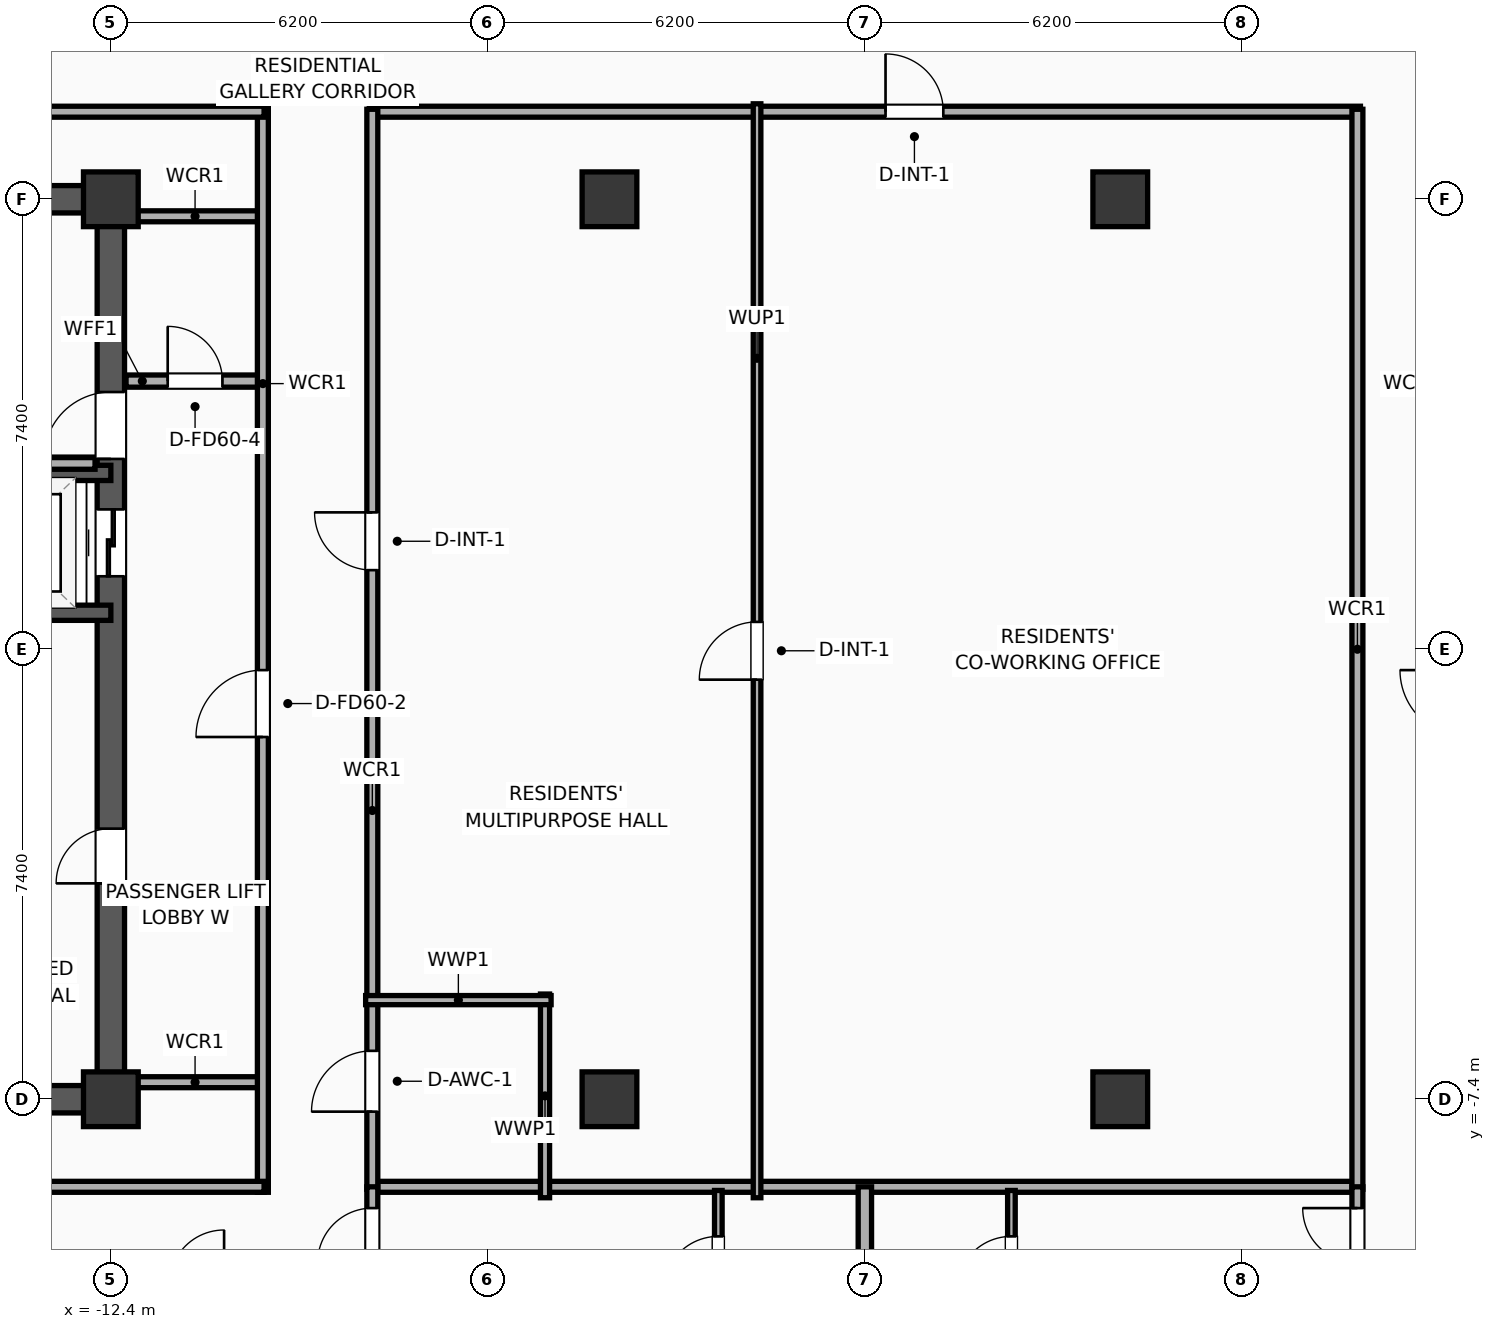
"""IFC4 building model, lengths in metres.
Left out: names, types, materials, properties, quantities, classifications, styles, units other than length and angle.
Written with IfcOpenShell. Run it as: python <this file> out.ifc"""

import sys

from ifc_helpers import new_model, si_unit, direction, frame, frame_2d, origin, origin_2d, place, context, subcontext, project, spatial, rectangle, extrude, element, fill, save


model = new_model("IFC4")
c1 = context("Model", 3, precision=1e-05, world=origin(), true_north=direction((0.0, 1.0)))
c2 = subcontext(c1, "Body", "Model", "MODEL_VIEW")
j1 = project(units=[si_unit("LENGTHUNIT", "METRE"), si_unit("PLANEANGLEUNIT", "RADIAN")], contexts=[c1])
p1 = place(None, origin())
s1 = spatial("IfcSite", under=j1, at=p1, CompositionType="ELEMENT")
p2 = place(p1, origin())
s2 = spatial("IfcBuilding", under=s1, at=p2, CompositionType="ELEMENT")
p3 = place(p2, frame((0.0, 0.0, 227.5)))
s3 = spatial("IfcBuildingStorey", under=s2, at=p3, CompositionType="ELEMENT", Elevation=227.5)
for number, where, z_axis, x_axis in (
    (1, (-12.4, -7.4, 0.0), (0.0, 0.0, 1.0), (1.0, 0.0, 0.0)),
    (2, (-12.4, 7.4, 0.0), (0.0, 0.0, 1.0), (1.0, 0.0, 0.0)),
):
    element("IfcColumn", number, at=place(p3, frame(where, z_axis=z_axis, x_axis=x_axis)), inside=s3, PredefinedType="COLUMN", context=c2, shape_type="SweptSolid", body=[
        extrude(rectangle(XDim=0.9, YDim=0.9, at=origin_2d()), origin(), (0.0, 0.0, 1.0), 3.9),
    ])
for number, where, z_axis, x_axis in (
    (3, (-19.425, -7.4, 0.0), (0.0, 0.0, 1.0), (1.0, 0.0, 0.0)),
    (4, (-19.425, 7.4, 0.0), (0.0, 0.0, 1.0), (1.0, 0.0, 0.0)),
):
    element("IfcWall", number, at=place(p3, frame(where, z_axis=z_axis, x_axis=x_axis)), inside=s3, PredefinedType="SHEAR", context=c2, shape_type="SweptSolid", body=[
        extrude(rectangle(XDim=7.25, YDim=0.45, at=frame_2d((3.625, 0.0))), origin(), (0.0, 0.0, 1.0), 3.65),
    ])
p4 = place(p3, frame((-12.4, -7.4, 0.0), z_axis=(0.0, 0.0, 1.0), x_axis=(0.0, 1.0, 0.0)))
e5 = element("IfcWall", 5, at=p4, inside=s3, PredefinedType="SHEAR", context=c2, shape_type="SweptSolid", body=[
    extrude(rectangle(XDim=14.8, YDim=0.45, at=frame_2d((7.4, 0.0))), origin(), (0.0, 0.0, 1.0), 3.65),
])
p5 = place(p4, frame((8.6, 0.0, 0.0)))
e6 = element("IfcOpeningElement", 6, at=p5, cuts=e5, PredefinedType="OPENING", context=c2, shape_type="SweptSolid", body=[
    extrude(rectangle(XDim=1.1, YDim=2.05, at=frame_2d((0.55, 1.025))), frame((0.0, 0.235, 0.0), z_axis=(0.0, -1.0, 0.0), x_axis=(1.0, 0.0, 0.0)), (0.0, 0.0, 1.0), 0.47),
])
p6 = place(p4, frame((10.53, 0.0, 0.0)))
e7 = element("IfcOpeningElement", 7, at=p6, cuts=e5, PredefinedType="OPENING", context=c2, shape_type="SweptSolid", body=[
    extrude(rectangle(XDim=1.1, YDim=2.05, at=frame_2d((0.55, 1.025))), frame((0.0, 0.235, 0.0), z_axis=(0.0, -1.0, 0.0), x_axis=(1.0, 0.0, 0.0)), (0.0, 0.0, 1.0), 0.47),
])
p7 = place(p4, frame((3.55, 0.0, 0.0)))
e8 = element("IfcOpeningElement", 8, at=p7, cuts=e5, PredefinedType="OPENING", context=c2, shape_type="SweptSolid", body=[
    extrude(rectangle(XDim=0.9, YDim=2.05, at=frame_2d((0.45, 1.025))), frame((0.0, 0.235, 0.0), z_axis=(0.0, -1.0, 0.0), x_axis=(1.0, 0.0, 0.0)), (0.0, 0.0, 1.0), 0.47),
])
for number, where, z_axis, x_axis in (
    (9, (-4.2, -7.4, 0.0), (0.0, 0.0, 1.0), (1.0, 0.0, 0.0)),
    (10, (-4.2, 7.4, 0.0), (0.0, 0.0, 1.0), (1.0, 0.0, 0.0)),
    (11, (4.2, -7.4, 0.0), (0.0, 0.0, 1.0), (1.0, 0.0, 0.0)),
    (12, (4.2, 7.4, 0.0), (0.0, 0.0, 1.0), (1.0, 0.0, 0.0)),
):
    element("IfcColumn", number, at=place(p3, frame(where, z_axis=z_axis, x_axis=x_axis)), inside=s3, PredefinedType="COLUMN", context=c2, shape_type="SweptSolid", body=[
        extrude(rectangle(XDim=0.9, YDim=0.9, at=origin_2d()), origin(), (0.0, 0.0, 1.0), 3.9),
    ])
for number, where, z_axis, x_axis in (
    (13, (-15.4, 0.6, 0.0), (0.0, 0.0, 1.0), (1.0, 0.0, 0.0)),
    (14, (-12.4, 2.9, 0.0), (0.0, 0.0, 1.0), (-1.0, 0.0, 0.0)),
):
    element("IfcWall", number, at=place(p3, frame(where, z_axis=z_axis, x_axis=x_axis)), inside=s3, PredefinedType="SOLIDWALL", context=c2, shape_type="SweptSolid", body=[
        extrude(rectangle(XDim=3.0, YDim=0.25, at=frame_2d((1.5, 0.0))), origin(), (0.0, 0.0, 1.0), 3.65),
    ])
p8 = place(p3, frame((-15.82, 3.06, 0.0), z_axis=(0.0, 0.0, 1.0), x_axis=(1.0, 0.0, 0.0)))
e15 = element("IfcWall", 15, at=p8, inside=s3, PredefinedType="PARTITIONING", context=c2, shape_type="SweptSolid", body=[
    extrude(rectangle(XDim=3.16, YDim=0.2, at=frame_2d((1.58, 0.0))), origin(), (0.0, 0.0, 1.0), 3.65),
])
p9 = place(p3, frame((-12.15, 4.41, 0.0), z_axis=(0.0, 0.0, 1.0), x_axis=(1.0, 0.0, 0.0)))
e16 = element("IfcWall", 16, at=p9, inside=s3, PredefinedType="PARTITIONING", context=c2, shape_type="SweptSolid", body=[
    extrude(rectangle(XDim=2.27, YDim=0.2, at=frame_2d((1.135, 0.0))), origin(), (0.0, 0.0, 1.0), 3.65),
])
p10 = place(p9, frame((0.685, 0.0, 0.0)))
e17 = element("IfcOpeningElement", 17, at=p10, cuts=e16, PredefinedType="OPENING", context=c2, shape_type="SweptSolid", body=[
    extrude(rectangle(XDim=0.9, YDim=2.05, at=frame_2d((0.45, 1.025))), frame((0.0, 0.11, 0.0), z_axis=(0.0, -1.0, 0.0), x_axis=(1.0, 0.0, 0.0)), (0.0, 0.0, 1.0), 0.22),
])
for number, where, z_axis, x_axis in (
    (18, (-12.15, 7.12, 0.0), (0.0, 0.0, 1.0), (1.0, 0.0, 0.0)),
    (19, (-12.15, -7.12, 0.0), (0.0, 0.0, 1.0), (1.0, 0.0, 0.0)),
):
    element("IfcWall", number, at=place(p3, frame(where, z_axis=z_axis, x_axis=x_axis)), inside=s3, PredefinedType="PARTITIONING", context=c2, shape_type="SweptSolid", body=[
        extrude(rectangle(XDim=2.27, YDim=0.18, at=frame_2d((1.135, 0.0))), origin(), (0.0, 0.0, 1.0), 3.65),
    ])
p11 = place(p3, frame((-9.9, -8.93, 0.0), z_axis=(0.0, 0.0, 1.0), x_axis=(0.0, 1.0, 0.0)))
e20 = element("IfcWall", 20, at=p11, inside=s3, PredefinedType="PARTITIONING", context=c2, shape_type="SweptSolid", body=[
    extrude(rectangle(XDim=17.86, YDim=0.18, at=frame_2d((8.93, 0.0))), origin(), (0.0, 0.0, 1.0), 3.65),
])
p12 = place(p11, frame((7.487, 0.0, 0.0)))
e21 = element("IfcOpeningElement", 21, at=p12, cuts=e20, PredefinedType="OPENING", context=c2, shape_type="SweptSolid", body=[
    extrude(rectangle(XDim=1.1, YDim=2.05, at=frame_2d((0.55, 1.025))), frame((0.0, 0.1, 0.0), z_axis=(0.0, -1.0, 0.0), x_axis=(1.0, 0.0, 0.0)), (0.0, 0.0, 1.0), 0.2),
])
p13 = place(p3, frame((-26.23, 8.84, 0.0), z_axis=(0.0, 0.0, 1.0), x_axis=(1.0, 0.0, 0.0)))
e22 = element("IfcWall", 22, at=p13, inside=s3, PredefinedType="PARTITIONING", context=c2, shape_type="SweptSolid", body=[
    extrude(rectangle(XDim=16.35, YDim=0.18, at=frame_2d((8.175, 0.0))), origin(), (0.0, 0.0, 1.0), 3.65),
])
p14 = place(p13, frame((2.2, 0.0, 0.0)))
e23 = element("IfcOpeningElement", 23, at=p14, cuts=e22, PredefinedType="OPENING", context=c2, shape_type="SweptSolid", body=[
    extrude(rectangle(XDim=1.15, YDim=2.05, at=frame_2d((0.575, 1.025))), frame((0.0, 0.1, 0.0), z_axis=(0.0, -1.0, 0.0), x_axis=(1.0, 0.0, 0.0)), (0.0, 0.0, 1.0), 0.2),
])
p15 = place(p3, frame((-26.23, -8.84, 0.0), z_axis=(0.0, 0.0, 1.0), x_axis=(1.0, 0.0, 0.0)))
e24 = element("IfcWall", 24, at=p15, inside=s3, PredefinedType="PARTITIONING", context=c2, shape_type="SweptSolid", body=[
    extrude(rectangle(XDim=16.35, YDim=0.18, at=frame_2d((8.175, 0.0))), origin(), (0.0, 0.0, 1.0), 3.65),
])
p16 = place(p3, frame((-8.15, 8.84, 0.0), z_axis=(0.0, 0.0, 1.0), x_axis=(1.0, 0.0, 0.0)))
e25 = element("IfcWall", 25, at=p16, inside=s3, PredefinedType="PARTITIONING", context=c2, shape_type="SweptSolid", body=[
    extrude(rectangle(XDim=16.3, YDim=0.18, at=frame_2d((8.15, 0.0))), origin(), (0.0, 0.0, 1.0), 3.65),
])
p17 = place(p16, frame((8.49, 0.0, 0.0)))
e26 = element("IfcOpeningElement", 26, at=p17, cuts=e25, PredefinedType="OPENING", context=c2, shape_type="SweptSolid", body=[
    extrude(rectangle(XDim=0.95, YDim=2.05, at=frame_2d((0.475, 1.025))), frame((0.0, 0.1, 0.0), z_axis=(0.0, -1.0, 0.0), x_axis=(1.0, 0.0, 0.0)), (0.0, 0.0, 1.0), 0.2),
])
p18 = place(p3, frame((-8.15, -8.84, 0.0), z_axis=(0.0, 0.0, 1.0), x_axis=(1.0, 0.0, 0.0)))
e27 = element("IfcWall", 27, at=p18, inside=s3, PredefinedType="PARTITIONING", context=c2, shape_type="SweptSolid", body=[
    extrude(rectangle(XDim=16.3, YDim=0.18, at=frame_2d((8.15, 0.0))), origin(), (0.0, 0.0, 1.0), 3.65),
])
p19 = place(p3, frame((-8.1, -8.88, 0.0), z_axis=(0.0, 0.0, 1.0), x_axis=(0.0, 1.0, 0.0)))
e28 = element("IfcWall", 28, at=p19, inside=s3, PredefinedType="PARTITIONING", context=c2, shape_type="SweptSolid", body=[
    extrude(rectangle(XDim=17.76, YDim=0.18, at=frame_2d((8.88, 0.0))), origin(), (0.0, 0.0, 1.0), 3.65),
])
p20 = place(p19, frame((1.276, 0.0, 0.0)))
e29 = element("IfcOpeningElement", 29, at=p20, cuts=e28, PredefinedType="OPENING", context=c2, shape_type="SweptSolid", body=[
    extrude(rectangle(XDim=1.0, YDim=2.05, at=frame_2d((0.5, 1.025))), frame((0.0, 0.1, 0.0), z_axis=(0.0, -1.0, 0.0), x_axis=(1.0, 0.0, 0.0)), (0.0, 0.0, 1.0), 0.2),
])
p21 = place(p19, frame((10.181, 0.0, 0.0)))
e30 = element("IfcOpeningElement", 30, at=p21, cuts=e28, PredefinedType="OPENING", context=c2, shape_type="SweptSolid", body=[
    extrude(rectangle(XDim=0.95, YDim=2.05, at=frame_2d((0.475, 1.025))), frame((0.0, 0.1, 0.0), z_axis=(0.0, -1.0, 0.0), x_axis=(1.0, 0.0, 0.0)), (0.0, 0.0, 1.0), 0.2),
])
p22 = place(p3, frame((8.1, -8.88, 0.0), z_axis=(0.0, 0.0, 1.0), x_axis=(0.0, 1.0, 0.0)))
e31 = element("IfcWall", 31, at=p22, inside=s3, PredefinedType="PARTITIONING", context=c2, shape_type="SweptSolid", body=[
    extrude(rectangle(XDim=17.76, YDim=0.18, at=frame_2d((8.88, 0.0))), origin(), (0.0, 0.0, 1.0), 3.65),
])
p23 = place(p3, frame((-5.26, -9.02, 0.0), z_axis=(0.0, 0.0, 1.0), x_axis=(0.0, 1.0, 0.0)))
e32 = element("IfcWall", 32, at=p23, inside=s3, PredefinedType="PLUMBINGWALL", context=c2, shape_type="SweptSolid", body=[
    extrude(rectangle(XDim=3.35, YDim=0.15, at=frame_2d((1.675, 0.0))), origin(), (0.0, 0.0, 1.0), 3.65),
])
p24 = place(p3, frame((-8.21, -5.77, 0.0), z_axis=(0.0, 0.0, 1.0), x_axis=(1.0, 0.0, 0.0)))
e33 = element("IfcWall", 33, at=p24, inside=s3, PredefinedType="PLUMBINGWALL", context=c2, shape_type="SweptSolid", body=[
    extrude(rectangle(XDim=3.05, YDim=0.15, at=frame_2d((1.525, 0.0))), origin(), (0.0, 0.0, 1.0), 3.65),
])
p25 = place(p3, frame((-1.773, -9.02, 0.0), z_axis=(0.0, 0.0, 1.0), x_axis=(0.0, 1.0, 0.0)))
e34 = element("IfcWall", 34, at=p25, inside=s3, PredefinedType="PARTITIONING", context=c2, shape_type="SweptSolid", body=[
    extrude(rectangle(XDim=17.99, YDim=0.125, at=frame_2d((8.995, 0.0))), origin(), (0.0, 0.0, 1.0), 3.65),
])
p26 = place(p25, frame((8.52, 0.0, 0.0)))
e35 = element("IfcOpeningElement", 35, at=p26, cuts=e34, PredefinedType="OPENING", context=c2, shape_type="SweptSolid", body=[
    extrude(rectangle(XDim=0.95, YDim=2.05, at=frame_2d((0.475, 1.025))), frame((0.0, 0.073, 0.0), z_axis=(0.0, -1.0, 0.0), x_axis=(1.0, 0.0, 0.0)), (0.0, 0.0, 1.0), 0.145),
])
p27 = place(p3, frame((-2.41, -11.31, 0.0), z_axis=(0.0, 0.0, 1.0), x_axis=(0.0, 1.0, 0.0)))
e36 = element("IfcWall", 36, at=p27, inside=s3, PredefinedType="PARTITIONING", context=c2, shape_type="SweptSolid", body=[
    extrude(rectangle(XDim=2.41, YDim=0.125, at=frame_2d((1.205, 0.0))), origin(), (0.0, 0.0, 1.0), 3.65),
])
p28 = place(p27, frame((0.755, 0.0, 0.0)))
e37 = element("IfcOpeningElement", 37, at=p28, cuts=e36, PredefinedType="OPENING", context=c2, shape_type="SweptSolid", body=[
    extrude(rectangle(XDim=0.9, YDim=2.05, at=frame_2d((0.45, 1.025))), frame((0.0, 0.073, 0.0), z_axis=(0.0, -1.0, 0.0), x_axis=(1.0, 0.0, 0.0)), (0.0, 0.0, 1.0), 0.145),
])
p29 = place(p3, frame((-8.1, -18.83, 0.0), z_axis=(0.0, 0.0, 1.0), x_axis=(0.0, 1.0, 0.0)))
e38 = element("IfcWall", 38, at=p29, inside=s3, PredefinedType="PARTITIONING", context=c2, shape_type="SweptSolid", body=[
    extrude(rectangle(XDim=9.99, YDim=0.18, at=frame_2d((4.995, 0.0))), origin(), (0.0, 0.0, 1.0), 3.65),
])
p30 = place(p29, frame((8.74, 0.0, 0.0)))
e39 = element("IfcOpeningElement", 39, at=p30, cuts=e38, PredefinedType="OPENING", context=c2, shape_type="SweptSolid", body=[
    extrude(rectangle(XDim=0.9, YDim=2.05, at=frame_2d((0.45, 1.025))), frame((0.0, 0.1, 0.0), z_axis=(0.0, -1.0, 0.0), x_axis=(1.0, 0.0, 0.0)), (0.0, 0.0, 1.0), 0.2),
])
p31 = place(p3, frame((2.41, -11.31, 0.0), z_axis=(0.0, 0.0, 1.0), x_axis=(0.0, 1.0, 0.0)))
e40 = element("IfcWall", 40, at=p31, inside=s3, PredefinedType="PARTITIONING", context=c2, shape_type="SweptSolid", body=[
    extrude(rectangle(XDim=2.41, YDim=0.125, at=frame_2d((1.205, 0.0))), origin(), (0.0, 0.0, 1.0), 3.65),
])
p32 = place(p31, frame((0.755, 0.0, 0.0)))
e41 = element("IfcOpeningElement", 41, at=p32, cuts=e40, PredefinedType="OPENING", context=c2, shape_type="SweptSolid", body=[
    extrude(rectangle(XDim=0.9, YDim=2.05, at=frame_2d((0.45, 1.025))), frame((0.0, 0.073, 0.0), z_axis=(0.0, -1.0, 0.0), x_axis=(1.0, 0.0, 0.0)), (0.0, 0.0, 1.0), 0.145),
])
p33 = place(p3, frame((8.1, -18.83, 0.0), z_axis=(0.0, 0.0, 1.0), x_axis=(0.0, 1.0, 0.0)))
e42 = element("IfcWall", 42, at=p33, inside=s3, PredefinedType="PARTITIONING", context=c2, shape_type="SweptSolid", body=[
    extrude(rectangle(XDim=9.99, YDim=0.18, at=frame_2d((4.995, 0.0))), origin(), (0.0, 0.0, 1.0), 3.65),
])
p34 = place(p33, frame((8.74, 0.0, 0.0)))
e43 = element("IfcOpeningElement", 43, at=p34, cuts=e42, PredefinedType="OPENING", context=c2, shape_type="SweptSolid", body=[
    extrude(rectangle(XDim=0.9, YDim=2.05, at=frame_2d((0.45, 1.025))), frame((0.0, 0.1, 0.0), z_axis=(0.0, -1.0, 0.0), x_axis=(1.0, 0.0, 0.0)), (0.0, 0.0, 1.0), 0.2),
])
p35 = place(p3, frame((0.0, -18.83, 0.0), z_axis=(0.0, 0.0, 1.0), x_axis=(0.0, 1.0, 0.0)))
e44 = element("IfcWall", 44, at=p35, inside=s3, PredefinedType="PARTITIONING", context=c2, shape_type="SweptSolid", body=[
    extrude(rectangle(XDim=9.99, YDim=0.22, at=frame_2d((4.995, 0.0))), origin(), (0.0, 0.0, 1.0), 3.65),
])
p36 = place(p5, origin())
e45 = element("IfcDoor", 45, at=p36, inside=s3, OperationType="SLIDING_TO_LEFT", PredefinedType="DOOR", context=c2, shape_type="SweptSolid", body=[
    extrude(rectangle(XDim=1.1, YDim=2.05, at=frame_2d((0.55, 1.025))), frame((0.0, 0.025, 0.0), z_axis=(0.0, -1.0, 0.0), x_axis=(1.0, 0.0, 0.0)), (0.0, 0.0, 1.0), 0.05),
])
fill(e6, e45)
p37 = place(p10, origin())
e46 = element("IfcDoor", 46, at=p37, inside=s3, OperationType="SINGLE_SWING_LEFT", PredefinedType="DOOR", context=c2, shape_type="SweptSolid", body=[
    extrude(rectangle(XDim=0.9, YDim=2.05, at=frame_2d((0.45, 1.025))), frame((0.0, 0.025, 0.0), z_axis=(0.0, -1.0, 0.0), x_axis=(1.0, 0.0, 0.0)), (0.0, 0.0, 1.0), 0.05),
])
fill(e17, e46)
p38 = place(p12, origin())
e47 = element("IfcDoor", 47, at=p38, inside=s3, OperationType="SINGLE_SWING_LEFT", PredefinedType="DOOR", context=c2, shape_type="SweptSolid", body=[
    extrude(rectangle(XDim=1.1, YDim=2.05, at=frame_2d((0.55, 1.025))), frame((0.0, 0.025, 0.0), z_axis=(0.0, -1.0, 0.0), x_axis=(1.0, 0.0, 0.0)), (0.0, 0.0, 1.0), 0.05),
])
fill(e21, e47)
p39 = place(p17, origin())
e48 = element("IfcDoor", 48, at=p39, inside=s3, OperationType="SINGLE_SWING_LEFT", PredefinedType="DOOR", context=c2, shape_type="SweptSolid", body=[
    extrude(rectangle(XDim=0.95, YDim=2.05, at=frame_2d((0.475, 1.025))), frame((0.0, 0.025, 0.0), z_axis=(0.0, -1.0, 0.0), x_axis=(1.0, 0.0, 0.0)), (0.0, 0.0, 1.0), 0.05),
])
fill(e26, e48)
p40 = place(p20, origin())
e49 = element("IfcDoor", 49, at=p40, inside=s3, OperationType="SINGLE_SWING_LEFT", PredefinedType="DOOR", context=c2, shape_type="SweptSolid", body=[
    extrude(rectangle(XDim=1.0, YDim=2.05, at=frame_2d((0.5, 1.025))), frame((0.0, 0.025, 0.0), z_axis=(0.0, -1.0, 0.0), x_axis=(1.0, 0.0, 0.0)), (0.0, 0.0, 1.0), 0.05),
])
fill(e29, e49)
p41 = place(p21, origin())
e50 = element("IfcDoor", 50, at=p41, inside=s3, OperationType="SINGLE_SWING_RIGHT", PredefinedType="DOOR", context=c2, shape_type="SweptSolid", body=[
    extrude(rectangle(XDim=0.95, YDim=2.05, at=frame_2d((0.475, 1.025))), frame((0.0, 0.025, 0.0), z_axis=(0.0, -1.0, 0.0), x_axis=(1.0, 0.0, 0.0)), (0.0, 0.0, 1.0), 0.05),
])
fill(e30, e50)
p42 = place(p26, origin())
e51 = element("IfcDoor", 51, at=p42, inside=s3, OperationType="SINGLE_SWING_LEFT", PredefinedType="DOOR", context=c2, shape_type="SweptSolid", body=[
    extrude(rectangle(XDim=0.95, YDim=2.05, at=frame_2d((0.475, 1.025))), frame((0.0, 0.025, 0.0), z_axis=(0.0, -1.0, 0.0), x_axis=(1.0, 0.0, 0.0)), (0.0, 0.0, 1.0), 0.05),
])
fill(e35, e51)
p43 = place(p28, origin())
e52 = element("IfcDoor", 52, at=p43, inside=s3, OperationType="SINGLE_SWING_LEFT", PredefinedType="DOOR", context=c2, shape_type="SweptSolid", body=[
    extrude(rectangle(XDim=0.9, YDim=2.05, at=frame_2d((0.45, 1.025))), frame((0.0, 0.025, 0.0), z_axis=(0.0, -1.0, 0.0), x_axis=(1.0, 0.0, 0.0)), (0.0, 0.0, 1.0), 0.05),
])
fill(e37, e52)
p44 = place(p30, origin())
e53 = element("IfcDoor", 53, at=p44, inside=s3, OperationType="SINGLE_SWING_LEFT", PredefinedType="DOOR", context=c2, shape_type="SweptSolid", body=[
    extrude(rectangle(XDim=0.9, YDim=2.05, at=frame_2d((0.45, 1.025))), frame((0.0, 0.025, 0.0), z_axis=(0.0, -1.0, 0.0), x_axis=(1.0, 0.0, 0.0)), (0.0, 0.0, 1.0), 0.05),
])
fill(e39, e53)
p45 = place(p32, origin())
e54 = element("IfcDoor", 54, at=p45, inside=s3, OperationType="SINGLE_SWING_LEFT", PredefinedType="DOOR", context=c2, shape_type="SweptSolid", body=[
    extrude(rectangle(XDim=0.9, YDim=2.05, at=frame_2d((0.45, 1.025))), frame((0.0, 0.025, 0.0), z_axis=(0.0, -1.0, 0.0), x_axis=(1.0, 0.0, 0.0)), (0.0, 0.0, 1.0), 0.05),
])
fill(e41, e54)
p46 = place(p34, origin())
e55 = element("IfcDoor", 55, at=p46, inside=s3, OperationType="SINGLE_SWING_RIGHT", PredefinedType="DOOR", context=c2, shape_type="SweptSolid", body=[
    extrude(rectangle(XDim=0.9, YDim=2.05, at=frame_2d((0.45, 1.025))), frame((0.0, 0.025, 0.0), z_axis=(0.0, -1.0, 0.0), x_axis=(1.0, 0.0, 0.0)), (0.0, 0.0, 1.0), 0.05),
])
fill(e43, e55)
p47 = place(p6, origin())
e56 = element("IfcDoor", 56, at=p47, inside=s3, OperationType="SINGLE_SWING_LEFT", PredefinedType="DOOR", context=c2, shape_type="SweptSolid", body=[
    extrude(rectangle(XDim=1.1, YDim=2.05, at=frame_2d((0.55, 1.025))), frame((0.0, 0.025, 0.0), z_axis=(0.0, -1.0, 0.0), x_axis=(1.0, 0.0, 0.0)), (0.0, 0.0, 1.0), 0.05),
])
fill(e7, e56)
p48 = place(p7, origin())
e57 = element("IfcDoor", 57, at=p48, inside=s3, OperationType="SINGLE_SWING_LEFT", PredefinedType="DOOR", context=c2, shape_type="SweptSolid", body=[
    extrude(rectangle(XDim=0.9, YDim=2.05, at=frame_2d((0.45, 1.025))), frame((0.0, 0.025, 0.0), z_axis=(0.0, -1.0, 0.0), x_axis=(1.0, 0.0, 0.0)), (0.0, 0.0, 1.0), 0.05),
])
fill(e8, e57)
save(model, sys.argv[1])
